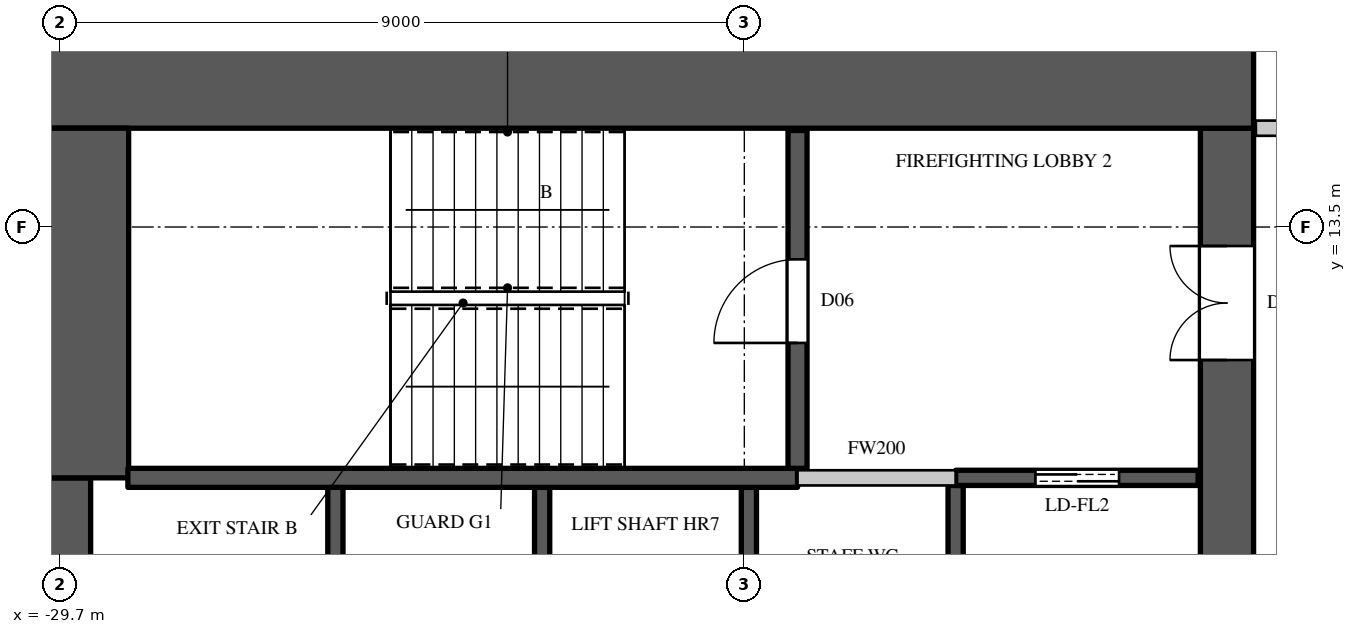
"""IFC4 building model, lengths in metres.
Left out: names, types, materials, properties, quantities, classifications, styles, units other than length and angle.
Written with IfcOpenShell. Run it as: python <this file> out.ifc"""

import sys

from ifc_helpers import new_model, si_unit, direction, frame, frame_2d, origin, place, context, subcontext, project, spatial, rectangle, extrude, element, fill, save


model = new_model("IFC4")
c1 = context("Model", 3, precision=1e-05, world=origin(), true_north=direction((0.0, 1.0)))
c2 = subcontext(c1, "Body", "Model", "MODEL_VIEW")
j1 = project(units=[si_unit("LENGTHUNIT", "METRE"), si_unit("PLANEANGLEUNIT", "RADIAN")], contexts=[c1])
p1 = place(None, origin())
s1 = spatial("IfcSite", under=j1, at=p1, CompositionType="ELEMENT")
p2 = place(p1, origin())
s2 = spatial("IfcBuilding", under=s1, at=p2, CompositionType="ELEMENT")
p3 = place(p2, frame((0.0, 0.0, 300.8)))
s3 = spatial("IfcBuildingStorey", under=s2, at=p3, CompositionType="ELEMENT", Elevation=300.8)
p4 = place(p3, frame((-30.0, 15.4, 0.0), z_axis=(0.0, 0.0, 1.0), x_axis=(1.0, 0.0, 0.0)))
e1 = element("IfcWall", 1, at=p4, inside=s3, PredefinedType="SHEAR", context=c2, shape_type="SweptSolid", body=[
    extrude(rectangle(XDim=16.0, YDim=1.2, at=frame_2d((8.0, 0.0))), origin(), (0.0, 0.0, 1.0), 4.1),
])
p5 = place(p3, frame((-14.35, -14.8, 0.0), z_axis=(0.0, 0.0, 1.0), x_axis=(0.0, 1.0, 0.0)))
e2 = element("IfcWall", 2, at=p5, inside=s3, PredefinedType="SHEAR", context=c2, shape_type="SweptSolid", body=[
    extrude(rectangle(XDim=29.6, YDim=0.7, at=frame_2d((14.8, 0.0))), origin(), (0.0, 0.0, 1.0), 4.1),
])
p6 = place(p5, frame((1.55, 0.0, 0.0)))
e3 = element("IfcOpeningElement", 3, at=p6, cuts=e2, PredefinedType="OPENING", context=c2, shape_type="SweptSolid", body=[
    extrude(rectangle(XDim=1.5, YDim=2.4, at=frame_2d((0.75, 1.2))), frame((0.0, 0.36, 0.0), z_axis=(0.0, -1.0, 0.0), x_axis=(1.0, 0.0, 0.0)), (0.0, 0.0, 1.0), 0.72),
])
p7 = place(p5, frame((26.55, 0.0, 0.0)))
e4 = element("IfcOpeningElement", 4, at=p7, cuts=e2, PredefinedType="OPENING", context=c2, shape_type="SweptSolid", body=[
    extrude(rectangle(XDim=1.5, YDim=2.4, at=frame_2d((0.75, 1.2))), frame((0.0, 0.36, 0.0), z_axis=(0.0, -1.0, 0.0), x_axis=(1.0, 0.0, 0.0)), (0.0, 0.0, 1.0), 0.72),
])
p8 = place(p5, frame((8.45, 0.0, 0.0)))
e5 = element("IfcOpeningElement", 5, at=p8, cuts=e2, PredefinedType="OPENING", context=c2, shape_type="SweptSolid", body=[
    extrude(rectangle(XDim=1.5, YDim=2.4, at=frame_2d((0.75, 1.2))), frame((0.0, 0.36, 0.0), z_axis=(0.0, -1.0, 0.0), x_axis=(1.0, 0.0, 0.0)), (0.0, 0.0, 1.0), 0.72),
])
p9 = place(p5, frame((19.65, 0.0, 0.0)))
e6 = element("IfcOpeningElement", 6, at=p9, cuts=e2, PredefinedType="OPENING", context=c2, shape_type="SweptSolid", body=[
    extrude(rectangle(XDim=1.5, YDim=2.4, at=frame_2d((0.75, 1.2))), frame((0.0, 0.36, 0.0), z_axis=(0.0, -1.0, 0.0), x_axis=(1.0, 0.0, 0.0)), (0.0, 0.0, 1.0), 0.72),
])
p10 = place(p5, frame((14.5, 0.0, 0.0)))
e7 = element("IfcOpeningElement", 7, at=p10, cuts=e2, PredefinedType="OPENING", context=c2, shape_type="SweptSolid", body=[
    extrude(rectangle(XDim=0.6, YDim=2.0, at=frame_2d((0.3, 1.0))), frame((0.0, 0.36, 0.0), z_axis=(0.0, -1.0, 0.0), x_axis=(1.0, 0.0, 0.0)), (0.0, 0.0, 1.0), 0.72),
])
p11 = place(p3, frame((-29.65, -10.2, 0.0), z_axis=(0.0, 0.0, 1.0), x_axis=(0.0, 1.0, 0.0)))
e8 = element("IfcWall", 8, at=p11, inside=s3, PredefinedType="SHEAR", context=c2, shape_type="SweptSolid", body=[
    extrude(rectangle(XDim=20.4, YDim=0.7, at=frame_2d((10.2, 0.0))), origin(), (0.0, 0.0, 1.0), 4.1),
])
p12 = place(p3, frame((-29.4, 10.2, 0.0), z_axis=(0.0, 0.0, 1.0), x_axis=(0.0, 1.0, 0.0)))
e9 = element("IfcWall", 9, at=p12, inside=s3, PredefinedType="SHEAR", context=c2, shape_type="SweptSolid", body=[
    extrude(rectangle(XDim=4.6, YDim=1.2, at=frame_2d((2.3, 0.0))), origin(), (0.0, 0.0, 1.0), 4.1),
])
p13 = place(p3, frame((-20.0, 10.2, 0.0), z_axis=(0.0, 0.0, 1.0), x_axis=(1.0, 0.0, 0.0)))
e10 = element("IfcWall", 10, at=p13, inside=s3, PredefinedType="PARTITIONING", context=c2, shape_type="SweptSolid", body=[
    extrude(rectangle(XDim=2.08, YDim=0.2, at=frame_2d((1.04, 0.0))), origin(), (0.0, 0.0, 1.0), 3.8),
])
p14 = place(p3, frame((-13.97, 14.8, 0.0), z_axis=(0.0, 0.0, 1.0), x_axis=(1.0, 0.0, 0.0)))
e11 = element("IfcWall", 11, at=p14, inside=s3, PredefinedType="PARTITIONING", context=c2, shape_type="SweptSolid", body=[
    extrude(rectangle(XDim=3.07, YDim=0.2, at=frame_2d((1.535, 0.0))), origin(), (0.0, 0.0, 1.0), 3.8),
])
for number, where, z_axis, x_axis in (
    (12, (-26.08, 7.5, 0.0), (0.0, 0.0, 1.0), (0.0, 1.0, 0.0)),
    (13, (-23.36, 7.5, 0.0), (0.0, 0.0, 1.0), (0.0, 1.0, 0.0)),
):
    element("IfcWall", number, at=place(p3, frame(where, z_axis=z_axis, x_axis=x_axis)), inside=s3, PredefinedType="SHEAR", context=c2, shape_type="SweptSolid", body=[
        extrude(rectangle(XDim=2.575, YDim=0.2, at=frame_2d((1.288, 0.0))), origin(), (0.0, 0.0, 1.0), 4.1),
    ])
p15 = place(p3, frame((-20.64, 7.5, 0.0), z_axis=(0.0, 0.0, 1.0), x_axis=(0.0, 1.0, 0.0)))
e14 = element("IfcWall", 14, at=p15, inside=s3, PredefinedType="SHEAR", context=c2, shape_type="SweptSolid", body=[
    extrude(rectangle(XDim=2.575, YDim=0.2, at=frame_2d((1.288, 0.0))), origin(), (0.0, 0.0, 1.0), 3.8),
])
p16 = place(p3, frame((-17.92, 7.5, 0.0), z_axis=(0.0, 0.0, 1.0), x_axis=(0.0, 1.0, 0.0)))
e15 = element("IfcWall", 15, at=p16, inside=s3, PredefinedType="SHEAR", context=c2, shape_type="SweptSolid", body=[
    extrude(rectangle(XDim=2.6, YDim=0.2, at=frame_2d((1.3, 0.0))), origin(), (0.0, 0.0, 1.0), 3.8),
])
p17 = place(p3, frame((-17.92, 10.2, 0.0), z_axis=(0.0, 0.0, 1.0), x_axis=(1.0, 0.0, 0.0)))
e16 = element("IfcWall", 16, at=p17, inside=s3, PredefinedType="SHEAR", context=c2, shape_type="SweptSolid", body=[
    extrude(rectangle(XDim=3.19, YDim=0.2, at=frame_2d((1.595, 0.0))), origin(), (0.0, 0.0, 1.0), 3.8),
])
p18 = place(p17, frame((1.05, 0.0, 0.0)))
e17 = element("IfcOpeningElement", 17, at=p18, cuts=e16, PredefinedType="OPENING", context=c2, shape_type="SweptSolid", body=[
    extrude(rectangle(XDim=1.1, YDim=2.2, at=frame_2d((0.55, 1.1))), frame((0.0, 0.11, 0.0), z_axis=(0.0, -1.0, 0.0), x_axis=(1.0, 0.0, 0.0)), (0.0, 0.0, 1.0), 0.22),
])
p19 = place(p3, frame((-28.81, 10.2, 0.0), z_axis=(0.0, 0.0, 1.0), x_axis=(1.0, 0.0, 0.0)))
e18 = element("IfcWall", 18, at=p19, inside=s3, PredefinedType="SHEAR", context=c2, shape_type="SweptSolid", body=[
    extrude(rectangle(XDim=8.81, YDim=0.25, at=frame_2d((4.405, 0.0))), origin(), (0.0, 0.0, 1.0), 3.8),
])
p20 = place(p3, frame((-20.0, 10.325, 0.0), z_axis=(0.0, 0.0, 1.0), x_axis=(0.0, 1.0, 0.0)))
e19 = element("IfcWall", 19, at=p20, inside=s3, PredefinedType="SHEAR", context=c2, shape_type="SweptSolid", body=[
    extrude(rectangle(XDim=4.445, YDim=0.25, at=frame_2d((2.223, 0.0))), origin(), (0.0, 0.0, 1.0), 3.8),
])
p21 = place(p20, frame((1.65, 0.0, 0.0)))
e20 = element("IfcOpeningElement", 20, at=p21, cuts=e19, PredefinedType="OPENING", context=c2, shape_type="SweptSolid", body=[
    extrude(rectangle(XDim=1.1, YDim=2.2, at=frame_2d((0.55, 1.1))), frame((0.0, 0.135, 0.0), z_axis=(0.0, -1.0, 0.0), x_axis=(1.0, 0.0, 0.0)), (0.0, 0.0, 1.0), 0.27),
])
p22 = place(p21, origin())
e21 = element("IfcDoor", 21, at=p22, inside=s3, OperationType="SINGLE_SWING_LEFT", PredefinedType="DOOR", context=c2, shape_type="SweptSolid", body=[
    extrude(rectangle(XDim=1.1, YDim=2.2, at=frame_2d((0.55, 1.1))), frame((0.0, 0.025, 0.0), z_axis=(0.0, -1.0, 0.0), x_axis=(1.0, 0.0, 0.0)), (0.0, 0.0, 1.0), 0.05),
])
fill(e20, e21)
p23 = place(p18, origin())
e22 = element("IfcDoor", 22, at=p23, inside=s3, OperationType="DOUBLE_DOOR_SLIDING", PredefinedType="DOOR", context=c2, shape_type="SweptSolid", body=[
    extrude(rectangle(XDim=1.1, YDim=2.2, at=frame_2d((0.55, 1.1))), frame((0.0, 0.025, 0.0), z_axis=(0.0, -1.0, 0.0), x_axis=(1.0, 0.0, 0.0)), (0.0, 0.0, 1.0), 0.05),
])
fill(e17, e22)
p24 = place(p7, origin())
e23 = element("IfcDoor", 23, at=p24, inside=s3, OperationType="DOUBLE_DOOR_SINGLE_SWING", PredefinedType="DOOR", context=c2, shape_type="SweptSolid", body=[
    extrude(rectangle(XDim=1.5, YDim=2.4, at=frame_2d((0.75, 1.2))), frame((0.0, 0.345, 0.0), z_axis=(0.0, -1.0, 0.0), x_axis=(1.0, 0.0, 0.0)), (0.0, 0.0, 1.0), 0.05),
])
fill(e4, e23)
save(model, sys.argv[1])
